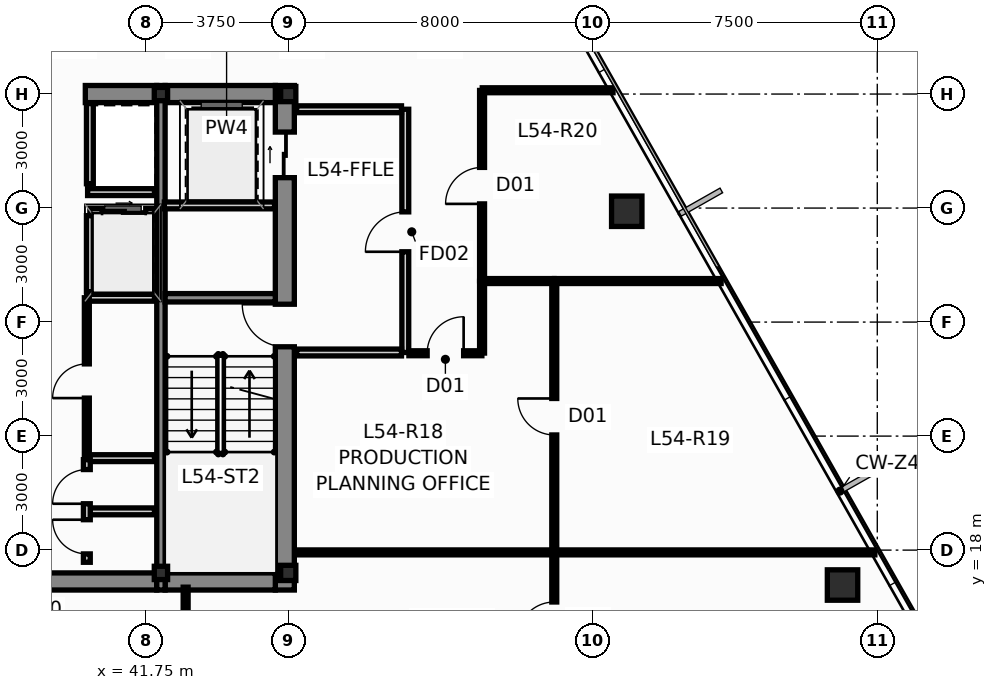
"""IFC4 building model, lengths in metres.
Left out: names, types, materials, properties, quantities, classifications, styles, units other than length and angle.
Written with IfcOpenShell. Run it as: python <this file> out.ifc"""

import sys

from ifc_helpers import new_model, si_unit, direction, frame, frame_2d, origin, origin_2d, place, context, subcontext, project, spatial, rectangle, hollow_rectangle, i_section, extrude, source, transform, mapped, element, fill, save


model = new_model("IFC4")
c1 = context("Model", 3, precision=1e-05, world=origin(), true_north=direction((0.0, 1.0)))
c2 = subcontext(c1, "Body", "Model", "MODEL_VIEW")
j1 = project(units=[si_unit("LENGTHUNIT", "METRE"), si_unit("PLANEANGLEUNIT", "RADIAN")], contexts=[c1])
p1 = place(None, origin())
s1 = spatial("IfcSite", under=j1, at=p1, CompositionType="ELEMENT")
p2 = place(p1, origin())
s2 = spatial("IfcBuilding", under=s1, at=p2, CompositionType="ELEMENT")
p3 = place(p2, frame((0.0, 0.0, 205.95)))
s3 = spatial("IfcBuildingStorey", under=s2, at=p3, CompositionType="ELEMENT", Elevation=205.95)
m1 = source(origin(), c2, "Body", "SweptSolid", [
    extrude(i_section(OverallWidth=0.4, OverallDepth=0.4, WebThickness=0.02, FlangeThickness=0.032, at=origin_2d()), origin(), (0.0, 0.0, 1.0), 3.65),
])
for number, where, z_axis, x_axis in (
    (1, (45.5, 17.4, 0.0), (0.0, 0.0, 1.0), (1.0, 0.0, 0.0)),
    (2, (45.5, 30.0, 0.0), (0.0, 0.0, 1.0), (1.0, 0.0, 0.0)),
):
    element("IfcColumn", number, at=place(p3, frame(where, z_axis=z_axis, x_axis=x_axis)), inside=s3, PredefinedType="COLUMN", context=c2, shape_type="MappedRepresentation", body=[
        mapped(m1, transform((0.0, 0.0, 0.0), scale=1.0)),
    ])
m2 = source(origin(), c2, "Body", "SweptSolid", [
    extrude(hollow_rectangle(XDim=0.35, YDim=0.35, WallThickness=0.016, at=origin_2d()), origin(), (0.0, 0.0, 1.0), 3.65),
])
for number, where, z_axis, x_axis in (
    (3, (42.15, 17.4, 0.0), (0.0, 0.0, 1.0), (1.0, 0.0, 0.0)),
    (4, (42.15, 30.0, 0.0), (0.0, 0.0, 1.0), (1.0, 0.0, 0.0)),
):
    element("IfcColumn", number, at=place(p3, frame(where, z_axis=z_axis, x_axis=x_axis)), inside=s3, PredefinedType="COLUMN", context=c2, shape_type="MappedRepresentation", body=[
        mapped(m2, transform((0.0, 0.0, 0.0), scale=1.0)),
    ])
p4 = place(p3, frame((45.41, 16.95, 0.0), z_axis=(0.0, 0.0, 1.0), x_axis=(0.0, 1.0, 0.0)))
e5 = element("IfcWall", 5, at=p4, inside=s3, PredefinedType="SHEAR", context=c2, shape_type="SweptSolid", body=[
    extrude(rectangle(XDim=13.275, YDim=0.5, at=frame_2d((6.638, 0.0))), origin(), (0.0, 0.0, 1.0), 3.65),
])
p5 = place(p4, frame((6.4, 0.0, 0.0)))
e6 = element("IfcOpeningElement", 6, at=p5, cuts=e5, PredefinedType="OPENING", context=c2, shape_type="SweptSolid", body=[
    extrude(rectangle(XDim=1.12, YDim=2.15, at=frame_2d((0.56, 1.075))), frame((0.0, 0.262, 0.0), z_axis=(0.0, -1.0, 0.0), x_axis=(1.0, 0.0, 0.0)), (0.0, 0.0, 1.0), 0.524),
])
p6 = place(p4, frame((10.85, 0.0, 0.0)))
e7 = element("IfcOpeningElement", 7, at=p6, cuts=e5, PredefinedType="OPENING", context=c2, shape_type="SweptSolid", body=[
    extrude(rectangle(XDim=1.2, YDim=2.2, at=frame_2d((0.6, 1.1))), frame((0.0, 0.262, 0.0), z_axis=(0.0, -1.0, 0.0), x_axis=(1.0, 0.0, 0.0)), (0.0, 0.0, 1.0), 0.524),
])
p7 = place(p3, frame((33.96, 17.175, 0.0), z_axis=(0.0, 0.0, 1.0), x_axis=(1.0, 0.0, 0.0)))
e8 = element("IfcWall", 8, at=p7, inside=s3, PredefinedType="SHEAR", context=c2, shape_type="SweptSolid", body=[
    extrude(rectangle(XDim=8.08, YDim=0.45, at=frame_2d((4.04, 0.0))), origin(), (0.0, 0.0, 1.0), 3.65),
])
p8 = place(p3, frame((42.26, 17.175, 0.0), z_axis=(0.0, 0.0, 1.0), x_axis=(1.0, 0.0, 0.0)))
e9 = element("IfcWall", 9, at=p8, inside=s3, PredefinedType="SHEAR", context=c2, shape_type="SweptSolid", body=[
    extrude(rectangle(XDim=2.9, YDim=0.45, at=frame_2d((1.45, 0.0))), origin(), (0.0, 0.0, 1.0), 3.65),
])
p9 = place(p3, frame((40.16, 30.0, 0.0), z_axis=(0.0, 0.0, 1.0), x_axis=(1.0, 0.0, 0.0)))
e10 = element("IfcWall", 10, at=p9, inside=s3, PredefinedType="SHEAR", context=c2, shape_type="SweptSolid", body=[
    extrude(rectangle(XDim=1.88, YDim=0.45, at=frame_2d((0.94, 0.0))), origin(), (0.0, 0.0, 1.0), 3.65),
])
p10 = place(p3, frame((42.26, 30.0, 0.0), z_axis=(0.0, 0.0, 1.0), x_axis=(1.0, 0.0, 0.0)))
e11 = element("IfcWall", 11, at=p10, inside=s3, PredefinedType="SHEAR", context=c2, shape_type="SweptSolid", body=[
    extrude(rectangle(XDim=2.9, YDim=0.45, at=frame_2d((1.45, 0.0))), origin(), (0.0, 0.0, 1.0), 3.65),
])
p11 = place(p3, frame((42.15, 16.95, 0.0), z_axis=(0.0, 0.0, 1.0), x_axis=(0.0, 1.0, 0.0)))
e12 = element("IfcWall", 12, at=p11, inside=s3, PredefinedType="SHEAR", context=c2, shape_type="SweptSolid", body=[
    extrude(rectangle(XDim=13.275, YDim=0.22, at=frame_2d((6.638, 0.0))), origin(), (0.0, 0.0, 1.0), 3.65),
])
p12 = place(p3, frame((42.26, 24.64, 0.0), z_axis=(0.0, 0.0, 1.0), x_axis=(1.0, 0.0, 0.0)))
e13 = element("IfcWall", 13, at=p12, inside=s3, PredefinedType="SHEAR", context=c2, shape_type="SweptSolid", body=[
    extrude(rectangle(XDim=2.9, YDim=0.22, at=frame_2d((1.45, 0.0))), origin(), (0.0, 0.0, 1.0), 3.65),
])
m3 = source(origin(), c2, "Body", "SweptSolid", [
    extrude(hollow_rectangle(XDim=0.8, YDim=0.8, WallThickness=0.045, at=origin_2d()), origin(), (0.0, 0.0, 1.0), 3.651),
])
p13 = place(p3, frame((60.085, 17.082, 0.0), z_axis=(-0.010364224337, -0.0215977062, 0.999713019792), x_axis=(0.901566609123, -0.432640323264, 0.0)))
e14 = element("IfcColumn", 14, at=p13, inside=s3, PredefinedType="COLUMN", context=c2, shape_type="MappedRepresentation", body=[
    mapped(m3, transform((0.0, 0.0, 0.0), scale=1.0)),
])
m4 = source(origin(), c2, "Body", "SweptSolid", [
    extrude(hollow_rectangle(XDim=0.8, YDim=0.8, WallThickness=0.045, at=origin_2d()), origin(), (0.0, 0.0, 1.0), 3.651),
])
p14 = place(p3, frame((54.407, 26.916, 0.0), z_axis=(-0.014912316331, -0.013775502979, 0.999793907933), x_axis=(0.678553674548, -0.734550822447, 0.0)))
e15 = element("IfcColumn", 15, at=p14, inside=s3, PredefinedType="COLUMN", context=c2, shape_type="MappedRepresentation", body=[
    mapped(m4, transform((0.0, 0.0, 0.0), scale=1.0)),
])
p15 = place(p3, frame((40.28, 26.9, 0.0), z_axis=(0.0, 0.0, 1.0), x_axis=(1.0, 0.0, 0.0)))
e16 = element("IfcWall", 16, at=p15, inside=s3, PredefinedType="PARTITIONING", context=c2, shape_type="SweptSolid", body=[
    extrude(rectangle(XDim=1.7, YDim=0.18, at=frame_2d((0.85, 0.0))), origin(), (0.0, 0.0, 1.0), 3.4),
])
p16 = place(p15, frame((0.32, 0.0, 0.0)))
e17 = element("IfcOpeningElement", 17, at=p16, cuts=e16, PredefinedType="OPENING", context=c2, shape_type="SweptSolid", body=[
    extrude(rectangle(XDim=1.15, YDim=2.2, at=frame_2d((0.575, 1.1))), frame((0.0, 0.102, 0.0), z_axis=(0.0, -1.0, 0.0), x_axis=(1.0, 0.0, 0.0)), (0.0, 0.0, 1.0), 0.204),
])
p17 = place(p3, frame((40.28, 24.8, 0.0), z_axis=(0.0, 0.0, 1.0), x_axis=(0.0, 1.0, 0.0)))
e18 = element("IfcWall", 18, at=p17, inside=s3, PredefinedType="PARTITIONING", context=c2, shape_type="SweptSolid", body=[
    extrude(rectangle(XDim=2.0, YDim=0.18, at=frame_2d((1.0, 0.0))), origin(), (0.0, 0.0, 1.0), 3.4),
])
p18 = place(p3, frame((40.2, 24.64, 0.0), z_axis=(0.0, 0.0, 1.0), x_axis=(1.0, 0.0, 0.0)))
e19 = element("IfcWall", 19, at=p18, inside=s3, PredefinedType="PARTITIONING", context=c2, shape_type="SweptSolid", body=[
    extrude(rectangle(XDim=1.78, YDim=0.18, at=frame_2d((0.89, 0.0))), origin(), (0.0, 0.0, 1.0), 3.4),
])
p19 = place(p3, frame((40.22, 27.42, 0.0), z_axis=(0.0, 0.0, 1.0), x_axis=(1.0, 0.0, 0.0)))
e20 = element("IfcWall", 20, at=p19, inside=s3, PredefinedType="PARTITIONING", context=c2, shape_type="SweptSolid", body=[
    extrude(rectangle(XDim=1.76, YDim=0.18, at=frame_2d((0.88, 0.0))), origin(), (0.0, 0.0, 1.0), 3.4),
])
p20 = place(p3, frame((40.28, 27.64, 0.0), z_axis=(0.0, 0.0, 1.0), x_axis=(0.0, 1.0, 0.0)))
e21 = element("IfcWall", 21, at=p20, inside=s3, PredefinedType="PARTITIONING", context=c2, shape_type="SweptSolid", body=[
    extrude(rectangle(XDim=2.11, YDim=0.18, at=frame_2d((1.055, 0.0))), origin(), (0.0, 0.0, 1.0), 3.4),
])
p21 = place(p3, frame((48.58, 23.2, 0.0), z_axis=(0.0, 0.0, 1.0), x_axis=(0.0, 1.0, 0.0)))
e22 = element("IfcWall", 22, at=p21, inside=s3, PredefinedType="PARTITIONING", context=c2, shape_type="SweptSolid", body=[
    extrude(rectangle(XDim=6.4, YDim=0.18, at=frame_2d((3.2, 0.0))), origin(), (0.0, 0.0, 1.0), 3.078),
])
p22 = place(p21, frame((2.65, 0.0, 0.0)))
e23 = element("IfcOpeningElement", 23, at=p22, cuts=e22, PredefinedType="OPENING", context=c2, shape_type="SweptSolid", body=[
    extrude(rectangle(XDim=1.05, YDim=2.15, at=frame_2d((0.525, 1.075))), frame((0.0, 0.102, 0.0), z_axis=(0.0, -1.0, 0.0), x_axis=(1.0, 0.0, 0.0)), (0.0, 0.0, 1.0), 0.204),
])
p23 = place(p3, frame((45.72, 23.2, 0.0), z_axis=(0.0, 0.0, 1.0), x_axis=(1.0, 0.0, 0.0)))
e24 = element("IfcWall", 24, at=p23, inside=s3, PredefinedType="PARTITIONING", context=c2, shape_type="SweptSolid", body=[
    extrude(rectangle(XDim=2.76, YDim=0.18, at=frame_2d((1.38, 0.0))), origin(), (0.0, 0.0, 1.0), 3.4),
])
p24 = place(p3, frame((45.72, 29.6, 0.0), z_axis=(0.0, 0.0, 1.0), x_axis=(1.0, 0.0, 0.0)))
e25 = element("IfcWall", 25, at=p24, inside=s3, PredefinedType="PARTITIONING", context=c2, shape_type="SweptSolid", body=[
    extrude(rectangle(XDim=2.76, YDim=0.18, at=frame_2d((1.38, 0.0))), origin(), (0.0, 0.0, 1.0), 2.925),
])
p25 = place(p3, frame((42.24, 27.07, 0.0), z_axis=(0.0, 0.0, 1.0), x_axis=(1.0, 0.0, 0.0)))
e26 = element("IfcWall", 26, at=p25, inside=s3, PredefinedType="PARTITIONING", context=c2, shape_type="SweptSolid", body=[
    extrude(rectangle(XDim=2.9, YDim=0.18, at=frame_2d((1.45, 0.0))), origin(), (0.0, 0.0, 1.0), 3.4),
])
p26 = place(p3, frame((40.22, 20.42, 0.0), z_axis=(0.0, 0.0, 1.0), x_axis=(1.0, 0.0, 0.0)))
e27 = element("IfcWall", 27, at=p26, inside=s3, PredefinedType="PARTITIONING", context=c2, shape_type="SweptSolid", body=[
    extrude(rectangle(XDim=1.76, YDim=0.18, at=frame_2d((0.88, 0.0))), origin(), (0.0, 0.0, 1.0), 3.4),
])
p27 = place(p3, frame((40.2, 20.5, 0.0), z_axis=(0.0, 0.0, 1.0), x_axis=(0.0, 1.0, 0.0)))
e28 = element("IfcWall", 28, at=p27, inside=s3, PredefinedType="PARTITIONING", context=c2, shape_type="SweptSolid", body=[
    extrude(rectangle(XDim=4.14, YDim=0.13, at=frame_2d((2.07, 0.0))), origin(), (0.0, 0.0, 1.0), 3.4),
])
p28 = place(p27, frame((1.5, 0.0, 0.0)))
e29 = element("IfcOpeningElement", 29, at=p28, cuts=e28, PredefinedType="OPENING", context=c2, shape_type="SweptSolid", body=[
    extrude(rectangle(XDim=0.9, YDim=2.1, at=frame_2d((0.45, 1.05))), frame((0.0, 0.077, 0.0), z_axis=(0.0, -1.0, 0.0), x_axis=(1.0, 0.0, 0.0)), (0.0, 0.0, 1.0), 0.154),
])
p29 = place(p3, frame((40.28, 19.02, 0.0), z_axis=(0.0, 0.0, 1.0), x_axis=(1.0, 0.0, 0.0)))
e30 = element("IfcWall", 30, at=p29, inside=s3, PredefinedType="PARTITIONING", context=c2, shape_type="SweptSolid", body=[
    extrude(rectangle(XDim=1.7, YDim=0.18, at=frame_2d((0.85, 0.0))), origin(), (0.0, 0.0, 1.0), 3.4),
])
p30 = place(p3, frame((40.2, 17.68, 0.0), z_axis=(0.0, 0.0, 1.0), x_axis=(0.0, 1.0, 0.0)))
e31 = element("IfcWall", 31, at=p30, inside=s3, PredefinedType="PARTITIONING", context=c2, shape_type="SweptSolid", body=[
    extrude(rectangle(XDim=2.7, YDim=0.18, at=frame_2d((1.35, 0.0))), origin(), (0.0, 0.0, 1.0), 3.4),
])
p31 = place(p30, frame((0.22, 0.0, 0.0)))
e32 = element("IfcOpeningElement", 32, at=p31, cuts=e31, PredefinedType="OPENING", context=c2, shape_type="SweptSolid", body=[
    extrude(rectangle(XDim=0.9, YDim=2.1, at=frame_2d((0.45, 1.05))), frame((0.0, 0.102, 0.0), z_axis=(0.0, -1.0, 0.0), x_axis=(1.0, 0.0, 0.0)), (0.0, 0.0, 1.0), 0.204),
])
p32 = place(p30, frame((1.54, 0.0, 0.0)))
e33 = element("IfcOpeningElement", 33, at=p32, cuts=e31, PredefinedType="OPENING", context=c2, shape_type="SweptSolid", body=[
    extrude(rectangle(XDim=0.9, YDim=2.1, at=frame_2d((0.45, 1.05))), frame((0.0, 0.102, 0.0), z_axis=(0.0, -1.0, 0.0), x_axis=(1.0, 0.0, 0.0)), (0.0, 0.0, 1.0), 0.204),
])
p33 = place(p3, frame((52.505, 17.94, 0.0), z_axis=(0.0, 0.0, 1.0), x_axis=(1.0, 0.0, 0.0)))
e34 = element("IfcWall", 34, at=p33, inside=s3, PredefinedType="PARTITIONING", context=c2, shape_type="SweptSolid", body=[
    extrude(rectangle(XDim=8.431, YDim=0.13, at=frame_2d((4.216, 0.0))), origin(), (0.0, 0.0, 1.0), 3.4),
])
p34 = place(p3, frame((52.5, 17.945, 0.0), z_axis=(0.0, 0.0, 1.0), x_axis=(0.0, 1.0, 0.0)))
e35 = element("IfcWall", 35, at=p34, inside=s3, PredefinedType="PARTITIONING", context=c2, shape_type="SweptSolid", body=[
    extrude(rectangle(XDim=7.13, YDim=0.13, at=frame_2d((3.565, 0.0))), origin(), (0.0, 0.0, 1.0), 3.078),
])
p35 = place(p34, frame((3.085, 0.0, 0.0)))
e36 = element("IfcOpeningElement", 36, at=p35, cuts=e35, PredefinedType="OPENING", context=c2, shape_type="SweptSolid", body=[
    extrude(rectangle(XDim=0.96, YDim=2.15, at=frame_2d((0.48, 1.075))), frame((0.0, 0.077, 0.0), z_axis=(0.0, -1.0, 0.0), x_axis=(1.0, 0.0, 0.0)), (0.0, 0.0, 1.0), 0.154),
])
p36 = place(p3, frame((45.675, 17.94, 0.0), z_axis=(0.0, 0.0, 1.0), x_axis=(1.0, 0.0, 0.0)))
e37 = element("IfcWall", 37, at=p36, inside=s3, PredefinedType="PARTITIONING", context=c2, shape_type="SweptSolid", body=[
    extrude(rectangle(XDim=6.82, YDim=0.13, at=frame_2d((3.41, 0.0))), origin(), (0.0, 0.0, 1.0), 3.4),
])
p37 = place(p3, frame((50.6, 25.085, 0.0), z_axis=(0.0, 0.0, 1.0), x_axis=(0.0, 1.0, 0.0)))
e38 = element("IfcWall", 38, at=p37, inside=s3, PredefinedType="PARTITIONING", context=c2, shape_type="SweptSolid", body=[
    extrude(rectangle(XDim=5.01, YDim=0.13, at=frame_2d((2.505, 0.0))), origin(), (0.0, 0.0, 1.0), 3.078),
])
p38 = place(p37, frame((2.025, 0.0, 0.0)))
e39 = element("IfcOpeningElement", 39, at=p38, cuts=e38, PredefinedType="OPENING", context=c2, shape_type="SweptSolid", body=[
    extrude(rectangle(XDim=0.96, YDim=2.15, at=frame_2d((0.48, 1.075))), frame((0.0, 0.077, 0.0), z_axis=(0.0, -1.0, 0.0), x_axis=(1.0, 0.0, 0.0)), (0.0, 0.0, 1.0), 0.154),
])
p39 = place(p3, frame((52.505, 25.08, 0.0), z_axis=(0.0, 0.0, 1.0), x_axis=(1.0, 0.0, 0.0)))
e40 = element("IfcWall", 40, at=p39, inside=s3, PredefinedType="PARTITIONING", context=c2, shape_type="SweptSolid", body=[
    extrude(rectangle(XDim=4.386, YDim=0.13, at=frame_2d((2.193, 0.0))), origin(), (0.0, 0.0, 1.0), 3.4),
])
p40 = place(p3, frame((52.5, 14.375, 0.0), z_axis=(0.0, 0.0, 1.0), x_axis=(0.0, 1.0, 0.0)))
e41 = element("IfcWall", 41, at=p40, inside=s3, PredefinedType="PARTITIONING", context=c2, shape_type="SweptSolid", body=[
    extrude(rectangle(XDim=3.56, YDim=0.13, at=frame_2d((1.78, 0.0))), origin(), (0.0, 0.0, 1.0), 3.078),
])
p41 = place(p40, frame((1.3, 0.0, 0.0)))
e42 = element("IfcOpeningElement", 42, at=p41, cuts=e41, PredefinedType="OPENING", context=c2, shape_type="SweptSolid", body=[
    extrude(rectangle(XDim=0.96, YDim=2.15, at=frame_2d((0.48, 1.075))), frame((0.0, 0.077, 0.0), z_axis=(0.0, -1.0, 0.0), x_axis=(1.0, 0.0, 0.0)), (0.0, 0.0, 1.0), 0.154),
])
p42 = place(p3, frame((50.605, 30.1, 0.0), z_axis=(0.0, 0.0, 1.0), x_axis=(1.0, 0.0, 0.0)))
e43 = element("IfcWall", 43, at=p42, inside=s3, PredefinedType="PARTITIONING", context=c2, shape_type="SweptSolid", body=[
    extrude(rectangle(XDim=3.441, YDim=0.13, at=frame_2d((1.721, 0.0))), origin(), (0.0, 0.0, 1.0), 3.4),
])
p43 = place(p3, frame((42.8, 14.375, 0.0), z_axis=(0.0, 0.0, 1.0), x_axis=(0.0, 1.0, 0.0)))
e44 = element("IfcWall", 44, at=p43, inside=s3, PredefinedType="PARTITIONING", context=c2, shape_type="SweptSolid", body=[
    extrude(rectangle(XDim=2.65, YDim=0.13, at=frame_2d((1.325, 0.0))), origin(), (0.0, 0.0, 1.0), 3.4),
])
p44 = place(p3, frame((48.675, 23.18, 0.0), z_axis=(0.0, 0.0, 1.0), x_axis=(1.0, 0.0, 0.0)))
e45 = element("IfcWall", 45, at=p44, inside=s3, PredefinedType="PARTITIONING", context=c2, shape_type="SweptSolid", body=[
    extrude(rectangle(XDim=1.92, YDim=0.13, at=frame_2d((0.96, 0.0))), origin(), (0.0, 0.0, 1.0), 3.4),
])
p45 = place(p44, frame((0.48, 0.0, 0.0)))
e46 = element("IfcOpeningElement", 46, at=p45, cuts=e45, PredefinedType="OPENING", context=c2, shape_type="SweptSolid", body=[
    extrude(rectangle(XDim=0.96, YDim=2.15, at=frame_2d((0.48, 1.075))), frame((0.0, 0.077, 0.0), z_axis=(0.0, -1.0, 0.0), x_axis=(1.0, 0.0, 0.0)), (0.0, 0.0, 1.0), 0.154),
])
p46 = place(p3, frame((50.6, 23.185, 0.0), z_axis=(0.0, 0.0, 1.0), x_axis=(0.0, 1.0, 0.0)))
e47 = element("IfcWall", 47, at=p46, inside=s3, PredefinedType="PARTITIONING", context=c2, shape_type="SweptSolid", body=[
    extrude(rectangle(XDim=1.89, YDim=0.13, at=frame_2d((0.945, 0.0))), origin(), (0.0, 0.0, 1.0), 3.078),
])
p47 = place(p3, frame((50.605, 25.08, 0.0), z_axis=(0.0, 0.0, 1.0), x_axis=(1.0, 0.0, 0.0)))
e48 = element("IfcWall", 48, at=p47, inside=s3, PredefinedType="PARTITIONING", context=c2, shape_type="SweptSolid", body=[
    extrude(rectangle(XDim=1.89, YDim=0.13, at=frame_2d((0.945, 0.0))), origin(), (0.0, 0.0, 1.0), 3.4),
])
p48 = place(p5, origin())
e49 = element("IfcDoor", 49, at=p48, inside=s3, OperationType="SINGLE_SWING_RIGHT", PredefinedType="DOOR", context=c2, shape_type="SweptSolid", body=[
    extrude(rectangle(XDim=1.12, YDim=2.15, at=frame_2d((0.56, 1.075))), frame((0.0, 0.025, 0.0), z_axis=(0.0, -1.0, 0.0), x_axis=(1.0, 0.0, 0.0)), (0.0, 0.0, 1.0), 0.05),
])
fill(e6, e49)
p49 = place(p6, origin())
e50 = element("IfcDoor", 50, at=p49, inside=s3, OperationType="SLIDING_TO_RIGHT", PredefinedType="DOOR", context=c2, shape_type="SweptSolid", body=[
    extrude(rectangle(XDim=1.2, YDim=2.2, at=frame_2d((0.6, 1.1))), frame((0.0, 0.025, 0.0), z_axis=(0.0, -1.0, 0.0), x_axis=(1.0, 0.0, 0.0)), (0.0, 0.0, 1.0), 0.05),
])
fill(e7, e50)
p50 = place(p16, origin())
e51 = element("IfcDoor", 51, at=p50, inside=s3, OperationType="SLIDING_TO_LEFT", PredefinedType="DOOR", context=c2, shape_type="SweptSolid", body=[
    extrude(rectangle(XDim=1.15, YDim=2.2, at=frame_2d((0.575, 1.1))), frame((0.0, 0.025, 0.0), z_axis=(0.0, -1.0, 0.0), x_axis=(1.0, 0.0, 0.0)), (0.0, 0.0, 1.0), 0.05),
])
fill(e17, e51)
p51 = place(p22, origin())
e52 = element("IfcDoor", 52, at=p51, inside=s3, OperationType="SINGLE_SWING_LEFT", PredefinedType="DOOR", context=c2, shape_type="SweptSolid", body=[
    extrude(rectangle(XDim=1.05, YDim=2.15, at=frame_2d((0.525, 1.075))), frame((0.0, 0.025, 0.0), z_axis=(0.0, -1.0, 0.0), x_axis=(1.0, 0.0, 0.0)), (0.0, 0.0, 1.0), 0.05),
])
fill(e23, e52)
p52 = place(p28, origin())
e53 = element("IfcDoor", 53, at=p52, inside=s3, OperationType="SINGLE_SWING_LEFT", PredefinedType="DOOR", context=c2, shape_type="SweptSolid", body=[
    extrude(rectangle(XDim=0.9, YDim=2.1, at=frame_2d((0.45, 1.05))), frame((0.0, 0.025, 0.0), z_axis=(0.0, -1.0, 0.0), x_axis=(1.0, 0.0, 0.0)), (0.0, 0.0, 1.0), 0.05),
])
fill(e29, e53)
p53 = place(p31, origin())
e54 = element("IfcDoor", 54, at=p53, inside=s3, OperationType="SINGLE_SWING_RIGHT", PredefinedType="DOOR", context=c2, shape_type="SweptSolid", body=[
    extrude(rectangle(XDim=0.9, YDim=2.1, at=frame_2d((0.45, 1.05))), frame((0.0, 0.025, 0.0), z_axis=(0.0, -1.0, 0.0), x_axis=(1.0, 0.0, 0.0)), (0.0, 0.0, 1.0), 0.05),
])
fill(e32, e54)
p54 = place(p32, origin())
e55 = element("IfcDoor", 55, at=p54, inside=s3, OperationType="SINGLE_SWING_LEFT", PredefinedType="DOOR", context=c2, shape_type="SweptSolid", body=[
    extrude(rectangle(XDim=0.9, YDim=2.1, at=frame_2d((0.45, 1.05))), frame((0.0, 0.025, 0.0), z_axis=(0.0, -1.0, 0.0), x_axis=(1.0, 0.0, 0.0)), (0.0, 0.0, 1.0), 0.05),
])
fill(e33, e55)
p55 = place(p35, origin())
e56 = element("IfcDoor", 56, at=p55, inside=s3, OperationType="SINGLE_SWING_RIGHT", PredefinedType="DOOR", context=c2, shape_type="SweptSolid", body=[
    extrude(rectangle(XDim=0.96, YDim=2.15, at=frame_2d((0.48, 1.075))), frame((0.0, 0.025, 0.0), z_axis=(0.0, -1.0, 0.0), x_axis=(1.0, 0.0, 0.0)), (0.0, 0.0, 1.0), 0.05),
])
fill(e36, e56)
p56 = place(p38, origin())
e57 = element("IfcDoor", 57, at=p56, inside=s3, OperationType="SINGLE_SWING_LEFT", PredefinedType="DOOR", context=c2, shape_type="SweptSolid", body=[
    extrude(rectangle(XDim=0.96, YDim=2.15, at=frame_2d((0.48, 1.075))), frame((0.0, 0.025, 0.0), z_axis=(0.0, -1.0, 0.0), x_axis=(1.0, 0.0, 0.0)), (0.0, 0.0, 1.0), 0.05),
])
fill(e39, e57)
p57 = place(p41, origin())
e58 = element("IfcDoor", 58, at=p57, inside=s3, OperationType="SINGLE_SWING_LEFT", PredefinedType="DOOR", context=c2, shape_type="SweptSolid", body=[
    extrude(rectangle(XDim=0.96, YDim=2.15, at=frame_2d((0.48, 1.075))), frame((0.0, 0.025, 0.0), z_axis=(0.0, -1.0, 0.0), x_axis=(1.0, 0.0, 0.0)), (0.0, 0.0, 1.0), 0.05),
])
fill(e42, e58)
p58 = place(p45, origin())
e59 = element("IfcDoor", 59, at=p58, inside=s3, OperationType="SINGLE_SWING_RIGHT", PredefinedType="DOOR", context=c2, shape_type="SweptSolid", body=[
    extrude(rectangle(XDim=0.96, YDim=2.15, at=frame_2d((0.48, 1.075))), frame((0.0, 0.025, 0.0), z_axis=(0.0, -1.0, 0.0), x_axis=(1.0, 0.0, 0.0)), (0.0, 0.0, 1.0), 0.05),
])
fill(e46, e59)
save(model, sys.argv[1])
